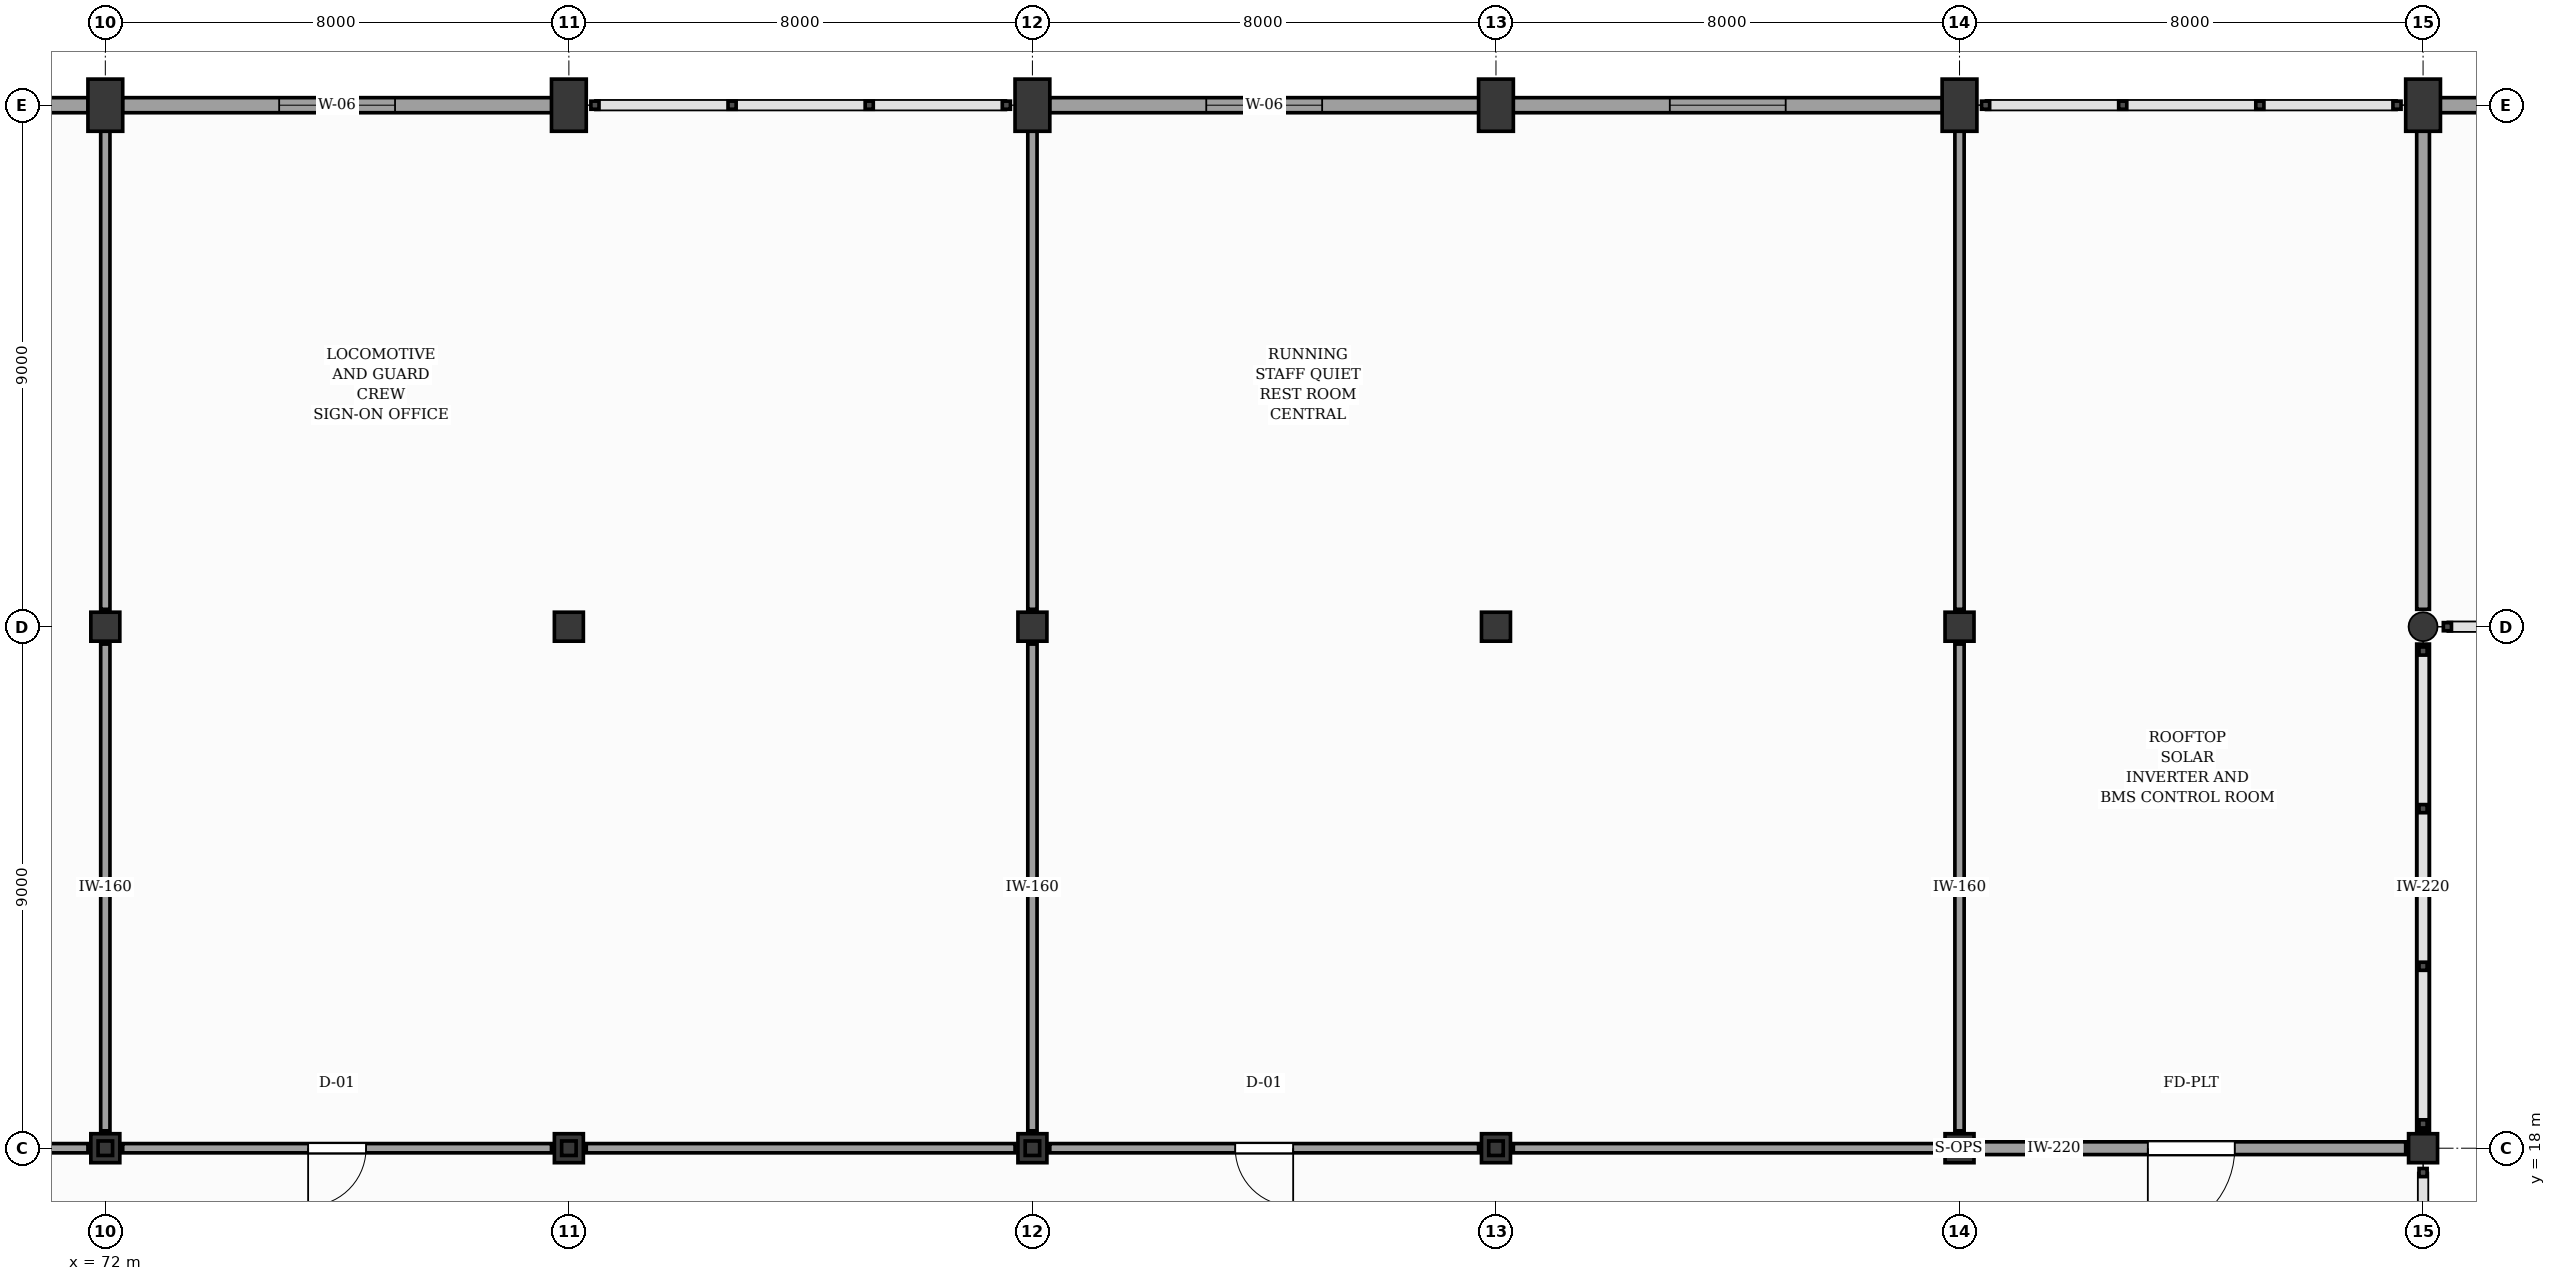
"""IFC4 building model, lengths in metres.
Left out: names, types, materials, properties, quantities, classifications, styles, units other than length and angle.
Written with IfcOpenShell. Run it as: python <this file> out.ifc"""

import sys

from ifc_helpers import new_model, si_unit, direction, frame, frame_2d, origin, origin_2d, place, context, subcontext, project, spatial, rectangle, circle, i_section, extrude, element, fill, save


model = new_model("IFC4")
c1 = context("Model", 3, precision=1e-05, world=origin(), true_north=direction((0.0, 1.0)))
c2 = subcontext(c1, "Body", "Model", "MODEL_VIEW")
j1 = project(units=[si_unit("LENGTHUNIT", "METRE"), si_unit("PLANEANGLEUNIT", "RADIAN")], contexts=[c1])
p1 = place(None, origin())
s1 = spatial("IfcSite", under=j1, at=p1, CompositionType="ELEMENT")
p2 = place(p1, origin())
s2 = spatial("IfcBuilding", under=s1, at=p2, CompositionType="ELEMENT")
p3 = place(p2, frame((0.0, 0.0, 24.6)))
s3 = spatial("IfcBuildingStorey", under=s2, at=p3, CompositionType="ELEMENT", Elevation=24.6)
for number, where, z_axis, x_axis in (
    (1, (72.0, 18.0, 0.0), (0.0, 0.0, 1.0), (1.0, 0.0, 0.0)),
    (2, (72.0, 27.0, 0.0), (0.0, 0.0, 1.0), (1.0, 0.0, 0.0)),
):
    element("IfcColumn", number, at=place(p3, frame(where, z_axis=z_axis, x_axis=x_axis)), inside=s3, PredefinedType="COLUMN", context=c2, shape_type="SweptSolid", body=[
        extrude(rectangle(XDim=0.5, YDim=0.5, at=origin_2d()), origin(), (0.0, 0.0, 1.0), 4.2),
    ])
p4 = place(p3, frame((72.0, 36.0, 0.0), z_axis=(0.0, 0.0, 1.0), x_axis=(1.0, 0.0, 0.0)))
e3 = element("IfcColumn", 3, at=p4, inside=s3, PredefinedType="COLUMN", context=c2, shape_type="SweptSolid", body=[
    extrude(rectangle(XDim=0.6, YDim=0.9, at=origin_2d()), origin(), (0.0, 0.0, 1.0), 4.2),
])
for number, where, z_axis, x_axis in (
    (4, (80.0, 18.0, 0.0), (0.0, 0.0, 1.0), (1.0, 0.0, 0.0)),
    (5, (80.0, 27.0, 0.0), (0.0, 0.0, 1.0), (1.0, 0.0, 0.0)),
):
    element("IfcColumn", number, at=place(p3, frame(where, z_axis=z_axis, x_axis=x_axis)), inside=s3, PredefinedType="COLUMN", context=c2, shape_type="SweptSolid", body=[
        extrude(rectangle(XDim=0.5, YDim=0.5, at=origin_2d()), origin(), (0.0, 0.0, 1.0), 4.2),
    ])
p5 = place(p3, frame((80.0, 36.0, 0.0), z_axis=(0.0, 0.0, 1.0), x_axis=(1.0, 0.0, 0.0)))
e6 = element("IfcColumn", 6, at=p5, inside=s3, PredefinedType="COLUMN", context=c2, shape_type="SweptSolid", body=[
    extrude(rectangle(XDim=0.6, YDim=0.9, at=origin_2d()), origin(), (0.0, 0.0, 1.0), 4.2),
])
for number, where, z_axis, x_axis in (
    (7, (88.0, 18.0, 0.0), (0.0, 0.0, 1.0), (1.0, 0.0, 0.0)),
    (8, (88.0, 27.0, 0.0), (0.0, 0.0, 1.0), (1.0, 0.0, 0.0)),
):
    element("IfcColumn", number, at=place(p3, frame(where, z_axis=z_axis, x_axis=x_axis)), inside=s3, PredefinedType="COLUMN", context=c2, shape_type="SweptSolid", body=[
        extrude(rectangle(XDim=0.5, YDim=0.5, at=origin_2d()), origin(), (0.0, 0.0, 1.0), 4.2),
    ])
p6 = place(p3, frame((88.0, 36.0, 0.0), z_axis=(0.0, 0.0, 1.0), x_axis=(1.0, 0.0, 0.0)))
e9 = element("IfcColumn", 9, at=p6, inside=s3, PredefinedType="COLUMN", context=c2, shape_type="SweptSolid", body=[
    extrude(rectangle(XDim=0.6, YDim=0.9, at=origin_2d()), origin(), (0.0, 0.0, 1.0), 4.2),
])
for number, where, z_axis, x_axis in (
    (10, (96.0, 18.0, 0.0), (0.0, 0.0, 1.0), (1.0, 0.0, 0.0)),
    (11, (96.0, 27.0, 0.0), (0.0, 0.0, 1.0), (1.0, 0.0, 0.0)),
):
    element("IfcColumn", number, at=place(p3, frame(where, z_axis=z_axis, x_axis=x_axis)), inside=s3, PredefinedType="COLUMN", context=c2, shape_type="SweptSolid", body=[
        extrude(rectangle(XDim=0.5, YDim=0.5, at=origin_2d()), origin(), (0.0, 0.0, 1.0), 4.2),
    ])
p7 = place(p3, frame((96.0, 36.0, 0.0), z_axis=(0.0, 0.0, 1.0), x_axis=(1.0, 0.0, 0.0)))
e12 = element("IfcColumn", 12, at=p7, inside=s3, PredefinedType="COLUMN", context=c2, shape_type="SweptSolid", body=[
    extrude(rectangle(XDim=0.6, YDim=0.9, at=origin_2d()), origin(), (0.0, 0.0, 1.0), 4.2),
])
for number, where, z_axis, x_axis in (
    (13, (104.0, 18.0, 0.0), (0.0, 0.0, 1.0), (1.0, 0.0, 0.0)),
    (14, (104.0, 27.0, 0.0), (0.0, 0.0, 1.0), (1.0, 0.0, 0.0)),
):
    element("IfcColumn", number, at=place(p3, frame(where, z_axis=z_axis, x_axis=x_axis)), inside=s3, PredefinedType="COLUMN", context=c2, shape_type="SweptSolid", body=[
        extrude(rectangle(XDim=0.5, YDim=0.5, at=origin_2d()), origin(), (0.0, 0.0, 1.0), 4.2),
    ])
p8 = place(p3, frame((104.0, 36.0, 0.0), z_axis=(0.0, 0.0, 1.0), x_axis=(1.0, 0.0, 0.0)))
e15 = element("IfcColumn", 15, at=p8, inside=s3, PredefinedType="COLUMN", context=c2, shape_type="SweptSolid", body=[
    extrude(rectangle(XDim=0.6, YDim=0.9, at=origin_2d()), origin(), (0.0, 0.0, 1.0), 4.2),
])
p9 = place(p3, frame((112.0, 18.0, 0.0), z_axis=(0.0, 0.0, 1.0), x_axis=(1.0, 0.0, 0.0)))
e16 = element("IfcColumn", 16, at=p9, inside=s3, PredefinedType="COLUMN", context=c2, shape_type="SweptSolid", body=[
    extrude(rectangle(XDim=0.5, YDim=0.5, at=origin_2d()), origin(), (0.0, 0.0, 1.0), 4.2),
])
p10 = place(p3, frame((112.0, 27.0, 0.0), z_axis=(0.0, 0.0, 1.0), x_axis=(1.0, 0.0, 0.0)))
e17 = element("IfcColumn", 17, at=p10, inside=s3, PredefinedType="COLUMN", context=c2, shape_type="SweptSolid", body=[
    extrude(circle(Radius=0.25, at=origin_2d()), origin(), (0.0, 0.0, 1.0), 4.2),
])
p11 = place(p3, frame((112.0, 36.0, 0.0), z_axis=(0.0, 0.0, 1.0), x_axis=(1.0, 0.0, 0.0)))
e18 = element("IfcColumn", 18, at=p11, inside=s3, PredefinedType="COLUMN", context=c2, shape_type="SweptSolid", body=[
    extrude(rectangle(XDim=0.6, YDim=0.9, at=origin_2d()), origin(), (0.0, 0.0, 1.0), 4.2),
])
for number, where, z_axis, x_axis in (
    (19, (72.0, 18.0, 4.2), (0.0, 0.0, 1.0), (1.0, 0.0, 0.0)),
    (20, (80.0, 18.0, 4.2), (0.0, 0.0, 1.0), (1.0, 0.0, 0.0)),
    (21, (88.0, 18.0, 4.2), (0.0, 0.0, 1.0), (1.0, 0.0, 0.0)),
    (22, (96.0, 18.0, 4.2), (0.0, 0.0, 1.0), (1.0, 0.0, 0.0)),
    (23, (104.0, 18.0, 4.2), (0.0, 0.0, 1.0), (1.0, 0.0, 0.0)),
):
    element("IfcColumn", number, at=place(p3, frame(where, z_axis=z_axis, x_axis=x_axis)), inside=s3, PredefinedType="COLUMN", context=c2, shape_type="SweptSolid", body=[
        extrude(i_section(OverallWidth=0.25, OverallDepth=0.25, WebThickness=0.009, FlangeThickness=0.01, FilletRadius=0.01, at=origin_2d()), origin(), (0.0, 0.0, 1.0), 3.5),
    ])
p12 = place(p3, frame((64.295, 36.0, 0.0), z_axis=(0.0, 0.0, 1.0), x_axis=(1.0, 0.0, 0.0)))
e24 = element("IfcWall", 24, at=p12, inside=s3, PredefinedType="SOLIDWALL", context=c2, shape_type="SweptSolid", body=[
    extrude(rectangle(XDim=7.41, YDim=0.26, at=frame_2d((3.705, 0.0))), origin(), (0.0, 0.0, 1.0), 3.24),
])
p13 = place(p12, frame((2.705, 0.0, 1.45)))
e25 = element("IfcOpeningElement", 25, at=p13, cuts=e24, PredefinedType="OPENING", context=c2, shape_type="SweptSolid", body=[
    extrude(rectangle(XDim=2.0, YDim=1.55, at=frame_2d((1.0, 0.775))), frame((0.0, 0.14, 0.0), z_axis=(0.0, -1.0, 0.0), x_axis=(1.0, 0.0, 0.0)), (0.0, 0.0, 1.0), 0.28),
])
p14 = place(p3, frame((72.295, 36.0, 0.0), z_axis=(0.0, 0.0, 1.0), x_axis=(1.0, 0.0, 0.0)))
e26 = element("IfcWall", 26, at=p14, inside=s3, PredefinedType="SOLIDWALL", context=c2, shape_type="SweptSolid", body=[
    extrude(rectangle(XDim=7.41, YDim=0.26, at=frame_2d((3.705, 0.0))), origin(), (0.0, 0.0, 1.0), 3.24),
])
p15 = place(p14, frame((2.705, 0.0, 1.45)))
e27 = element("IfcOpeningElement", 27, at=p15, cuts=e26, PredefinedType="OPENING", context=c2, shape_type="SweptSolid", body=[
    extrude(rectangle(XDim=2.0, YDim=1.55, at=frame_2d((1.0, 0.775))), frame((0.0, 0.14, 0.0), z_axis=(0.0, -1.0, 0.0), x_axis=(1.0, 0.0, 0.0)), (0.0, 0.0, 1.0), 0.28),
])
p16 = place(p3, frame((88.295, 36.0, 0.0), z_axis=(0.0, 0.0, 1.0), x_axis=(1.0, 0.0, 0.0)))
e28 = element("IfcWall", 28, at=p16, inside=s3, PredefinedType="SOLIDWALL", context=c2, shape_type="SweptSolid", body=[
    extrude(rectangle(XDim=7.41, YDim=0.26, at=frame_2d((3.705, 0.0))), origin(), (0.0, 0.0, 1.0), 3.24),
])
p17 = place(p16, frame((2.705, 0.0, 1.45)))
e29 = element("IfcOpeningElement", 29, at=p17, cuts=e28, PredefinedType="OPENING", context=c2, shape_type="SweptSolid", body=[
    extrude(rectangle(XDim=2.0, YDim=1.55, at=frame_2d((1.0, 0.775))), frame((0.0, 0.14, 0.0), z_axis=(0.0, -1.0, 0.0), x_axis=(1.0, 0.0, 0.0)), (0.0, 0.0, 1.0), 0.28),
])
p18 = place(p3, frame((96.295, 36.0, 0.0), z_axis=(0.0, 0.0, 1.0), x_axis=(1.0, 0.0, 0.0)))
e30 = element("IfcWall", 30, at=p18, inside=s3, PredefinedType="SOLIDWALL", context=c2, shape_type="SweptSolid", body=[
    extrude(rectangle(XDim=7.41, YDim=0.26, at=frame_2d((3.705, 0.0))), origin(), (0.0, 0.0, 1.0), 3.24),
])
p19 = place(p18, frame((2.705, 0.0, 1.45)))
e31 = element("IfcOpeningElement", 31, at=p19, cuts=e30, PredefinedType="OPENING", context=c2, shape_type="SweptSolid", body=[
    extrude(rectangle(XDim=2.0, YDim=1.55, at=frame_2d((1.0, 0.775))), frame((0.0, 0.14, 0.0), z_axis=(0.0, -1.0, 0.0), x_axis=(1.0, 0.0, 0.0)), (0.0, 0.0, 1.0), 0.28),
])
p20 = place(p3, frame((112.295, 36.0, 0.0), z_axis=(0.0, 0.0, 1.0), x_axis=(1.0, 0.0, 0.0)))
e32 = element("IfcWall", 32, at=p20, inside=s3, PredefinedType="SOLIDWALL", context=c2, shape_type="SweptSolid", body=[
    extrude(rectangle(XDim=7.41, YDim=0.26, at=frame_2d((3.705, 0.0))), origin(), (0.0, 0.0, 1.0), 3.24),
])
p21 = place(p20, frame((2.705, 0.0, 1.45)))
e33 = element("IfcOpeningElement", 33, at=p21, cuts=e32, PredefinedType="OPENING", context=c2, shape_type="SweptSolid", body=[
    extrude(rectangle(XDim=2.0, YDim=1.55, at=frame_2d((1.0, 0.775))), frame((0.0, 0.14, 0.0), z_axis=(0.0, -1.0, 0.0), x_axis=(1.0, 0.0, 0.0)), (0.0, 0.0, 1.0), 0.28),
])
p22 = place(p3, frame((64.3, 18.0, 0.0), z_axis=(0.0, 0.0, 1.0), x_axis=(1.0, 0.0, 0.0)))
e34 = element("IfcWall", 34, at=p22, inside=s3, PredefinedType="PARTITIONING", context=c2, shape_type="SweptSolid", body=[
    extrude(rectangle(XDim=7.4, YDim=0.16, at=frame_2d((3.7, 0.0))), origin(), (0.0, 0.0, 1.0), 3.1),
])
p23 = place(p22, frame((2.8, 0.0, 0.0)))
e35 = element("IfcOpeningElement", 35, at=p23, cuts=e34, PredefinedType="OPENING", context=c2, shape_type="SweptSolid", body=[
    extrude(rectangle(XDim=1.8, YDim=2.25, at=frame_2d((0.9, 1.125))), frame((0.0, 0.09, 0.0), z_axis=(0.0, -1.0, 0.0), x_axis=(1.0, 0.0, 0.0)), (0.0, 0.0, 1.0), 0.18),
])
for number, where, z_axis, x_axis in (
    (36, (72.0, 18.3, 0.0), (0.0, 0.0, 1.0), (0.0, 1.0, 0.0)),
    (37, (72.0, 27.3, 0.0), (0.0, 0.0, 1.0), (0.0, 1.0, 0.0)),
):
    element("IfcWall", number, at=place(p3, frame(where, z_axis=z_axis, x_axis=x_axis)), inside=s3, PredefinedType="PARTITIONING", context=c2, shape_type="SweptSolid", body=[
        extrude(rectangle(XDim=8.4, YDim=0.16, at=frame_2d((4.2, 0.0))), origin(), (0.0, 0.0, 1.0), 3.1),
    ])
p24 = place(p3, frame((72.3, 18.0, 0.0), z_axis=(0.0, 0.0, 1.0), x_axis=(1.0, 0.0, 0.0)))
e38 = element("IfcWall", 38, at=p24, inside=s3, PredefinedType="PARTITIONING", context=c2, shape_type="SweptSolid", body=[
    extrude(rectangle(XDim=7.4, YDim=0.16, at=frame_2d((3.7, 0.0))), origin(), (0.0, 0.0, 1.0), 3.1),
])
p25 = place(p24, frame((3.2, 0.0, 0.0)))
e39 = element("IfcOpeningElement", 39, at=p25, cuts=e38, PredefinedType="OPENING", context=c2, shape_type="SweptSolid", body=[
    extrude(rectangle(XDim=1.0, YDim=2.1, at=frame_2d((0.5, 1.05))), frame((0.0, 0.09, 0.0), z_axis=(0.0, -1.0, 0.0), x_axis=(1.0, 0.0, 0.0)), (0.0, 0.0, 1.0), 0.18),
])
p26 = place(p3, frame((80.3, 18.0, 0.0), z_axis=(0.0, 0.0, 1.0), x_axis=(1.0, 0.0, 0.0)))
e40 = element("IfcWall", 40, at=p26, inside=s3, PredefinedType="PARTITIONING", context=c2, shape_type="SweptSolid", body=[
    extrude(rectangle(XDim=7.4, YDim=0.16, at=frame_2d((3.7, 0.0))), origin(), (0.0, 0.0, 1.0), 3.1),
])
for number, where, z_axis, x_axis in (
    (41, (88.0, 18.3, 0.0), (0.0, 0.0, 1.0), (0.0, 1.0, 0.0)),
    (42, (88.0, 27.3, 0.0), (0.0, 0.0, 1.0), (0.0, 1.0, 0.0)),
):
    element("IfcWall", number, at=place(p3, frame(where, z_axis=z_axis, x_axis=x_axis)), inside=s3, PredefinedType="PARTITIONING", context=c2, shape_type="SweptSolid", body=[
        extrude(rectangle(XDim=8.4, YDim=0.16, at=frame_2d((4.2, 0.0))), origin(), (0.0, 0.0, 1.0), 3.1),
    ])
p27 = place(p3, frame((88.3, 18.0, 0.0), z_axis=(0.0, 0.0, 1.0), x_axis=(1.0, 0.0, 0.0)))
e43 = element("IfcWall", 43, at=p27, inside=s3, PredefinedType="PARTITIONING", context=c2, shape_type="SweptSolid", body=[
    extrude(rectangle(XDim=7.4, YDim=0.16, at=frame_2d((3.7, 0.0))), origin(), (0.0, 0.0, 1.0), 3.1),
])
p28 = place(p27, frame((3.2, 0.0, 0.0)))
e44 = element("IfcOpeningElement", 44, at=p28, cuts=e43, PredefinedType="OPENING", context=c2, shape_type="SweptSolid", body=[
    extrude(rectangle(XDim=1.0, YDim=2.1, at=frame_2d((0.5, 1.05))), frame((0.0, 0.09, 0.0), z_axis=(0.0, -1.0, 0.0), x_axis=(1.0, 0.0, 0.0)), (0.0, 0.0, 1.0), 0.18),
])
p29 = place(p3, frame((96.3, 18.0, 0.0), z_axis=(0.0, 0.0, 1.0), x_axis=(1.0, 0.0, 0.0)))
e45 = element("IfcWall", 45, at=p29, inside=s3, PredefinedType="PARTITIONING", context=c2, shape_type="SweptSolid", body=[
    extrude(rectangle(XDim=7.4, YDim=0.16, at=frame_2d((3.7, 0.0))), origin(), (0.0, 0.0, 1.0), 3.1),
])
for number, where, z_axis, x_axis in (
    (46, (104.0, 18.3, 0.0), (0.0, 0.0, 1.0), (0.0, 1.0, 0.0)),
    (47, (104.0, 27.3, 0.0), (0.0, 0.0, 1.0), (0.0, 1.0, 0.0)),
):
    element("IfcWall", number, at=place(p3, frame(where, z_axis=z_axis, x_axis=x_axis)), inside=s3, PredefinedType="PARTITIONING", context=c2, shape_type="SweptSolid", body=[
        extrude(rectangle(XDim=8.4, YDim=0.16, at=frame_2d((4.2, 0.0))), origin(), (0.0, 0.0, 1.0), 3.1),
    ])
p30 = place(p3, frame((104.3, 18.0, 0.0), z_axis=(0.0, 0.0, 1.0), x_axis=(1.0, 0.0, 0.0)))
e48 = element("IfcWall", 48, at=p30, inside=s3, PredefinedType="SOLIDWALL", context=c2, shape_type="SweptSolid", body=[
    extrude(rectangle(XDim=7.4, YDim=0.22, at=frame_2d((3.7, 0.0))), origin(), (0.0, 0.0, 1.0), 3.1),
])
p31 = place(p30, frame((2.95, 0.0, 0.0)))
e49 = element("IfcOpeningElement", 49, at=p31, cuts=e48, PredefinedType="OPENING", context=c2, shape_type="SweptSolid", body=[
    extrude(rectangle(XDim=1.5, YDim=2.2, at=frame_2d((0.75, 1.1))), frame((0.0, 0.12, 0.0), z_axis=(0.0, -1.0, 0.0), x_axis=(1.0, 0.0, 0.0)), (0.0, 0.0, 1.0), 0.24),
])
for number, where, z_axis, x_axis in (
    (50, (112.0, 18.3, 0.0), (0.0, 0.0, 1.0), (0.0, 1.0, 0.0)),
    (51, (112.0, 27.3, 0.0), (0.0, 0.0, 1.0), (0.0, 1.0, 0.0)),
):
    element("IfcWall", number, at=place(p3, frame(where, z_axis=z_axis, x_axis=x_axis)), inside=s3, PredefinedType="SOLIDWALL", context=c2, shape_type="SweptSolid", body=[
        extrude(rectangle(XDim=8.4, YDim=0.22, at=frame_2d((4.2, 0.0))), origin(), (0.0, 0.0, 1.0), 3.1),
    ])
p32 = place(p15, origin())
e52 = element("IfcWindow", 52, at=p32, inside=s3, PartitioningType="SINGLE_PANEL", PredefinedType="WINDOW", context=c2, shape_type="SweptSolid", body=[
    extrude(rectangle(XDim=2.0, YDim=1.55, at=frame_2d((1.0, 0.775))), frame((0.0, 0.03, 0.0), z_axis=(0.0, -1.0, 0.0), x_axis=(1.0, 0.0, 0.0)), (0.0, 0.0, 1.0), 0.06),
])
fill(e27, e52)
p33 = place(p17, origin())
e53 = element("IfcWindow", 53, at=p33, inside=s3, PartitioningType="SINGLE_PANEL", PredefinedType="WINDOW", context=c2, shape_type="SweptSolid", body=[
    extrude(rectangle(XDim=2.0, YDim=1.55, at=frame_2d((1.0, 0.775))), frame((0.0, 0.03, 0.0), z_axis=(0.0, -1.0, 0.0), x_axis=(1.0, 0.0, 0.0)), (0.0, 0.0, 1.0), 0.06),
])
fill(e29, e53)
p34 = place(p19, origin())
e54 = element("IfcWindow", 54, at=p34, inside=s3, PartitioningType="SINGLE_PANEL", PredefinedType="WINDOW", context=c2, shape_type="SweptSolid", body=[
    extrude(rectangle(XDim=2.0, YDim=1.55, at=frame_2d((1.0, 0.775))), frame((0.0, 0.03, 0.0), z_axis=(0.0, -1.0, 0.0), x_axis=(1.0, 0.0, 0.0)), (0.0, 0.0, 1.0), 0.06),
])
fill(e31, e54)
p35 = place(p25, frame((1.0, 0.0, 0.0), z_axis=(0.0, 0.0, 1.0), x_axis=(-1.0, 0.0, 0.0)))
e55 = element("IfcDoor", 55, at=p35, inside=s3, OperationType="SINGLE_SWING_LEFT", PredefinedType="DOOR", context=c2, shape_type="SweptSolid", body=[
    extrude(rectangle(XDim=1.0, YDim=2.1, at=frame_2d((0.5, 1.05))), frame((0.0, 0.025, 0.0), z_axis=(0.0, -1.0, 0.0), x_axis=(1.0, 0.0, 0.0)), (0.0, 0.0, 1.0), 0.05),
])
fill(e39, e55)
p36 = place(p28, frame((1.0, 0.0, 0.0), z_axis=(0.0, 0.0, 1.0), x_axis=(-1.0, 0.0, 0.0)))
e56 = element("IfcDoor", 56, at=p36, inside=s3, OperationType="SINGLE_SWING_RIGHT", PredefinedType="DOOR", context=c2, shape_type="SweptSolid", body=[
    extrude(rectangle(XDim=1.0, YDim=2.1, at=frame_2d((0.5, 1.05))), frame((0.0, 0.025, 0.0), z_axis=(0.0, -1.0, 0.0), x_axis=(1.0, 0.0, 0.0)), (0.0, 0.0, 1.0), 0.05),
])
fill(e44, e56)
p37 = place(p31, frame((1.5, 0.0, 0.0), z_axis=(0.0, 0.0, 1.0), x_axis=(-1.0, 0.0, 0.0)))
e57 = element("IfcDoor", 57, at=p37, inside=s3, OperationType="SINGLE_SWING_LEFT", PredefinedType="DOOR", context=c2, shape_type="SweptSolid", body=[
    extrude(rectangle(XDim=1.5, YDim=2.2, at=frame_2d((0.75, 1.1))), frame((0.0, 0.025, 0.0), z_axis=(0.0, -1.0, 0.0), x_axis=(1.0, 0.0, 0.0)), (0.0, 0.0, 1.0), 0.05),
])
fill(e49, e57)
save(model, sys.argv[1])
